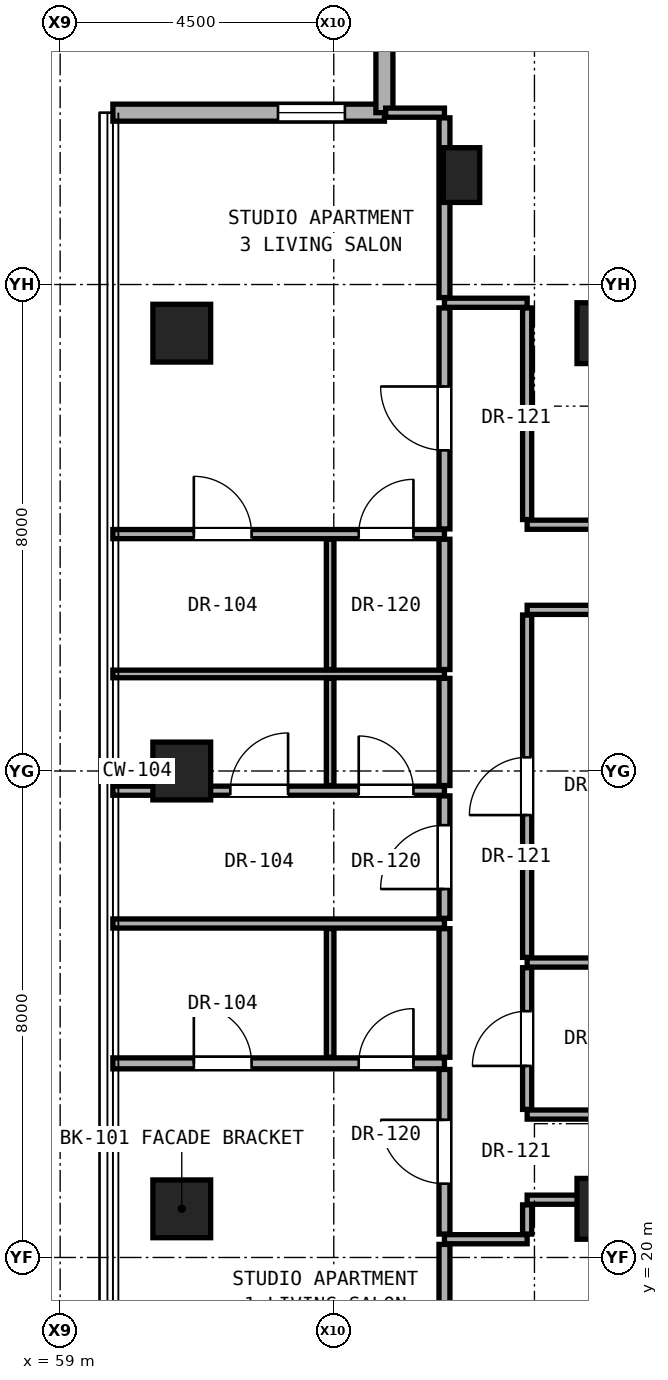
"""IFC4 building model, lengths in metres.
Left out: names, types, materials, properties, quantities, classifications, styles, units other than length and angle.
Written with IfcOpenShell. Run it as: python <this file> out.ifc"""

import sys

from ifc_helpers import new_model, si_unit, direction, frame, frame_2d, origin, origin_2d, place, context, subcontext, project, spatial, rectangle, hollow_rectangle, extrude, element, fill, save


model = new_model("IFC4")
c1 = context("Model", 3, precision=1e-05, world=origin(), true_north=direction((0.0, 1.0)))
c2 = subcontext(c1, "Body", "Model", "MODEL_VIEW")
j1 = project(units=[si_unit("LENGTHUNIT", "METRE"), si_unit("PLANEANGLEUNIT", "RADIAN")], contexts=[c1])
p1 = place(None, origin())
s1 = spatial("IfcSite", under=j1, at=p1, CompositionType="ELEMENT")
p2 = place(p1, origin())
s2 = spatial("IfcBuilding", under=s1, at=p2, CompositionType="ELEMENT")
p3 = place(p2, frame((0.0, 0.0, 154.4)))
s3 = spatial("IfcBuildingStorey", under=s2, at=p3, CompositionType="ELEMENT", Elevation=154.4)
for number, where, z_axis, x_axis in (
    (1, (68.0, 20.8, 0.0), (0.0, 0.0, 1.0), (1.0, 0.0, 0.0)),
    (2, (68.0, 35.2, 0.0), (0.0, 0.0, 1.0), (1.0, 0.0, 0.0)),
):
    element("IfcColumn", number, at=place(p3, frame(where, z_axis=z_axis, x_axis=x_axis)), inside=s3, PredefinedType="COLUMN", context=c2, shape_type="SweptSolid", body=[
        extrude(rectangle(XDim=1.0, YDim=1.0, at=origin_2d()), origin(), (0.0, 0.0, 1.0), 3.25),
    ])
for number, where, z_axis, x_axis in (
    (3, (61.0, 20.8, 0.0), (0.0, 0.0, 1.0), (1.0, 0.0, 0.0)),
    (4, (61.0, 28.0, 0.0), (0.0, 0.0, 1.0), (1.0, 0.0, 0.0)),
    (5, (61.0, 35.2, 0.0), (0.0, 0.0, 1.0), (1.0, 0.0, 0.0)),
):
    element("IfcColumn", number, at=place(p3, frame(where, z_axis=z_axis, x_axis=x_axis)), inside=s3, PredefinedType="COLUMN", context=c2, shape_type="SweptSolid", body=[
        extrude(hollow_rectangle(XDim=0.95, YDim=0.95, WallThickness=0.05, at=origin_2d()), origin(), (0.0, 0.0, 1.0), 3.25),
    ])
p4 = place(p3, frame((65.6, 37.8, 0.0), z_axis=(0.0, 0.0, 1.0), x_axis=(1.0, 0.0, 0.0)))
e6 = element("IfcColumn", 6, at=p4, inside=s3, PredefinedType="PILASTER", context=c2, shape_type="SweptSolid", body=[
    extrude(rectangle(XDim=0.6, YDim=0.9, at=origin_2d()), origin(), (0.0, 0.0, 1.0), 3.25),
])
p5 = place(p3, frame((64.333, 38.826, 0.0), z_axis=(0.0, 0.0, 1.0), x_axis=(-1.0, 0.0, 0.0)))
e7 = element("IfcWall", 7, at=p5, inside=s3, PredefinedType="SOLIDWALL", context=c2, shape_type="SweptSolid", body=[
    extrude(rectangle(XDim=4.465, YDim=0.28, at=frame_2d((2.233, 0.0))), origin(), (0.0, 0.0, 1.0), 3.03),
])
p6 = place(p5, frame((0.65, 0.0, 0.85)))
e8 = element("IfcOpeningElement", 8, at=p6, cuts=e7, PredefinedType="OPENING", context=c2, shape_type="SweptSolid", body=[
    extrude(rectangle(XDim=1.1, YDim=2.0, at=frame_2d((0.55, 1.0))), frame((0.0, 0.15, 0.0), z_axis=(0.0, -1.0, 0.0), x_axis=(1.0, 0.0, 0.0)), (0.0, 0.0, 1.0), 0.3),
])
p7 = place(p3, frame((64.333, 43.292, 0.0), z_axis=(0.0, 0.0, 1.0), x_axis=(0.0, -1.0, 0.0)))
e9 = element("IfcWall", 9, at=p7, inside=s3, PredefinedType="SOLIDWALL", context=c2, shape_type="SweptSolid", body=[
    extrude(rectangle(XDim=4.465, YDim=0.28, at=frame_2d((2.232, 0.0))), origin(), (0.0, 0.0, 1.0), 3.03),
])
p8 = place(p3, frame((65.32, 20.3, 0.0), z_axis=(0.0, 0.0, 1.0), x_axis=(1.0, 0.0, 0.0)))
e10 = element("IfcWall", 10, at=p8, inside=s3, PredefinedType="PARTITIONING", context=c2, shape_type="SweptSolid", body=[
    extrude(rectangle(XDim=1.36, YDim=0.15, at=frame_2d((0.68, 0.0))), origin(), (0.0, 0.0, 1.0), 3.05),
])
p9 = place(p3, frame((66.68, 20.95, 0.0), z_axis=(0.0, 0.0, 1.0), x_axis=(1.0, 0.0, 0.0)))
e11 = element("IfcWall", 11, at=p9, inside=s3, PredefinedType="PARTITIONING", context=c2, shape_type="SweptSolid", body=[
    extrude(rectangle(XDim=1.05, YDim=0.15, at=frame_2d((0.525, 0.0))), origin(), (0.0, 0.0, 1.0), 2.442),
])
p10 = place(p3, frame((66.68, 22.35, 0.0), z_axis=(0.0, 0.0, 1.0), x_axis=(1.0, 0.0, 0.0)))
e12 = element("IfcWall", 12, at=p10, inside=s3, PredefinedType="PARTITIONING", context=c2, shape_type="SweptSolid", body=[
    extrude(rectangle(XDim=19.5, YDim=0.15, at=frame_2d((9.75, 0.0))), origin(), (0.0, 0.0, 1.0), 2.186),
])
p11 = place(p10, frame((8.053, 0.0, 0.0)))
e13 = element("IfcOpeningElement", 13, at=p11, cuts=e12, PredefinedType="OPENING", context=c2, shape_type="SweptSolid", body=[
    extrude(rectangle(XDim=0.85, YDim=2.01, at=frame_2d((0.425, 1.005))), frame((0.0, 0.085, 0.0), z_axis=(0.0, -1.0, 0.0), x_axis=(1.0, 0.0, 0.0)), (0.0, 0.0, 1.0), 0.17),
])
p12 = place(p3, frame((59.867, 23.192, 0.0), z_axis=(0.0, 0.0, 1.0), x_axis=(1.0, 0.0, 0.0)))
e14 = element("IfcWall", 14, at=p12, inside=s3, PredefinedType="PARTITIONING", context=c2, shape_type="SweptSolid", body=[
    extrude(rectangle(XDim=5.453, YDim=0.18, at=frame_2d((2.727, 0.0))), origin(), (0.0, 0.0, 1.0), 2.269),
])
p13 = place(p12, frame((1.332, 0.0, 0.0)))
e15 = element("IfcOpeningElement", 15, at=p13, cuts=e14, PredefinedType="OPENING", context=c2, shape_type="SweptSolid", body=[
    extrude(rectangle(XDim=0.95, YDim=2.15, at=frame_2d((0.475, 1.075))), frame((0.0, 0.1, 0.0), z_axis=(0.0, -1.0, 0.0), x_axis=(1.0, 0.0, 0.0)), (0.0, 0.0, 1.0), 0.2),
])
p14 = place(p12, frame((4.043, 0.0, 0.0)))
e16 = element("IfcOpeningElement", 16, at=p14, cuts=e14, PredefinedType="OPENING", context=c2, shape_type="SweptSolid", body=[
    extrude(rectangle(XDim=0.9, YDim=2.1, at=frame_2d((0.45, 1.05))), frame((0.0, 0.1, 0.0), z_axis=(0.0, -1.0, 0.0), x_axis=(1.0, 0.0, 0.0)), (0.0, 0.0, 1.0), 0.2),
])
p15 = place(p3, frame((66.68, 24.85, 0.0), z_axis=(0.0, 0.0, 1.0), x_axis=(1.0, 0.0, 0.0)))
e17 = element("IfcWall", 17, at=p15, inside=s3, PredefinedType="PARTITIONING", context=c2, shape_type="SweptSolid", body=[
    extrude(rectangle(XDim=3.07, YDim=0.15, at=frame_2d((1.535, 0.0))), origin(), (0.0, 0.0, 1.0), 2.186),
])
p16 = place(p3, frame((59.867, 25.492, 0.0), z_axis=(0.0, 0.0, 1.0), x_axis=(1.0, 0.0, 0.0)))
e18 = element("IfcWall", 18, at=p16, inside=s3, PredefinedType="PARTITIONING", context=c2, shape_type="SweptSolid", body=[
    extrude(rectangle(XDim=5.453, YDim=0.15, at=frame_2d((2.727, 0.0))), origin(), (0.0, 0.0, 1.0), 2.269),
])
p17 = place(p3, frame((59.867, 27.676, 0.0), z_axis=(0.0, 0.0, 1.0), x_axis=(1.0, 0.0, 0.0)))
e19 = element("IfcWall", 19, at=p17, inside=s3, PredefinedType="PARTITIONING", context=c2, shape_type="SweptSolid", body=[
    extrude(rectangle(XDim=5.453, YDim=0.15, at=frame_2d((2.727, 0.0))), origin(), (0.0, 0.0, 1.0), 2.269),
])
p18 = place(p17, frame((1.931, 0.0, 0.0)))
e20 = element("IfcOpeningElement", 20, at=p18, cuts=e19, PredefinedType="OPENING", context=c2, shape_type="SweptSolid", body=[
    extrude(rectangle(XDim=0.95, YDim=2.15, at=frame_2d((0.475, 1.075))), frame((0.0, 0.085, 0.0), z_axis=(0.0, -1.0, 0.0), x_axis=(1.0, 0.0, 0.0)), (0.0, 0.0, 1.0), 0.17),
])
p19 = place(p17, frame((4.043, 0.0, 0.0)))
e21 = element("IfcOpeningElement", 21, at=p19, cuts=e19, PredefinedType="OPENING", context=c2, shape_type="SweptSolid", body=[
    extrude(rectangle(XDim=0.9, YDim=2.1, at=frame_2d((0.45, 1.05))), frame((0.0, 0.085, 0.0), z_axis=(0.0, -1.0, 0.0), x_axis=(1.0, 0.0, 0.0)), (0.0, 0.0, 1.0), 0.17),
])
p20 = place(p3, frame((59.867, 29.596, 0.0), z_axis=(0.0, 0.0, 1.0), x_axis=(1.0, 0.0, 0.0)))
e22 = element("IfcWall", 22, at=p20, inside=s3, PredefinedType="PARTITIONING", context=c2, shape_type="SweptSolid", body=[
    extrude(rectangle(XDim=5.453, YDim=0.125, at=frame_2d((2.727, 0.0))), origin(), (0.0, 0.0, 1.0), 2.269),
])
p21 = place(p3, frame((66.68, 30.65, 0.0), z_axis=(0.0, 0.0, 1.0), x_axis=(1.0, 0.0, 0.0)))
e23 = element("IfcWall", 23, at=p21, inside=s3, PredefinedType="PARTITIONING", context=c2, shape_type="SweptSolid", body=[
    extrude(rectangle(XDim=19.5, YDim=0.15, at=frame_2d((9.75, 0.0))), origin(), (0.0, 0.0, 1.0), 2.186),
])
p22 = place(p21, frame((3.745, 0.0, 0.0)))
e24 = element("IfcOpeningElement", 24, at=p22, cuts=e23, PredefinedType="OPENING", context=c2, shape_type="SweptSolid", body=[
    extrude(rectangle(XDim=0.95, YDim=2.15, at=frame_2d((0.475, 1.075))), frame((0.0, 0.085, 0.0), z_axis=(0.0, -1.0, 0.0), x_axis=(1.0, 0.0, 0.0)), (0.0, 0.0, 1.0), 0.17),
])
p23 = place(p21, frame((15.098, 0.0, 0.0)))
e25 = element("IfcOpeningElement", 25, at=p23, cuts=e23, PredefinedType="OPENING", context=c2, shape_type="SweptSolid", body=[
    extrude(rectangle(XDim=0.85, YDim=2.01, at=frame_2d((0.425, 1.005))), frame((0.0, 0.085, 0.0), z_axis=(0.0, -1.0, 0.0), x_axis=(1.0, 0.0, 0.0)), (0.0, 0.0, 1.0), 0.17),
])
p24 = place(p3, frame((59.867, 31.896, 0.0), z_axis=(0.0, 0.0, 1.0), x_axis=(1.0, 0.0, 0.0)))
e26 = element("IfcWall", 26, at=p24, inside=s3, PredefinedType="PARTITIONING", context=c2, shape_type="SweptSolid", body=[
    extrude(rectangle(XDim=5.453, YDim=0.15, at=frame_2d((2.727, 0.0))), origin(), (0.0, 0.0, 1.0), 2.269),
])
p25 = place(p24, frame((1.332, 0.0, 0.0)))
e27 = element("IfcOpeningElement", 27, at=p25, cuts=e26, PredefinedType="OPENING", context=c2, shape_type="SweptSolid", body=[
    extrude(rectangle(XDim=0.95, YDim=2.15, at=frame_2d((0.475, 1.075))), frame((0.0, 0.085, 0.0), z_axis=(0.0, -1.0, 0.0), x_axis=(1.0, 0.0, 0.0)), (0.0, 0.0, 1.0), 0.17),
])
p26 = place(p24, frame((4.043, 0.0, 0.0)))
e28 = element("IfcOpeningElement", 28, at=p26, cuts=e26, PredefinedType="OPENING", context=c2, shape_type="SweptSolid", body=[
    extrude(rectangle(XDim=0.9, YDim=2.1, at=frame_2d((0.45, 1.05))), frame((0.0, 0.085, 0.0), z_axis=(0.0, -1.0, 0.0), x_axis=(1.0, 0.0, 0.0)), (0.0, 0.0, 1.0), 0.17),
])
p27 = place(p3, frame((66.68, 32.05, 0.0), z_axis=(0.0, 0.0, 1.0), x_axis=(1.0, 0.0, 0.0)))
e29 = element("IfcWall", 29, at=p27, inside=s3, PredefinedType="PARTITIONING", context=c2, shape_type="SweptSolid", body=[
    extrude(rectangle(XDim=2.12, YDim=0.15, at=frame_2d((1.06, 0.0))), origin(), (0.0, 0.0, 1.0), 2.186),
])
p28 = place(p3, frame((65.32, 35.7, 0.0), z_axis=(0.0, 0.0, 1.0), x_axis=(1.0, 0.0, 0.0)))
e30 = element("IfcWall", 30, at=p28, inside=s3, PredefinedType="PARTITIONING", context=c2, shape_type="SweptSolid", body=[
    extrude(rectangle(XDim=1.36, YDim=0.15, at=frame_2d((0.68, 0.0))), origin(), (0.0, 0.0, 1.0), 3.05),
])
p29 = place(p3, frame((64.353, 38.826, 0.0), z_axis=(0.0, 0.0, 1.0), x_axis=(1.0, 0.0, 0.0)))
e31 = element("IfcWall", 31, at=p29, inside=s3, PredefinedType="PARTITIONING", context=c2, shape_type="SweptSolid", body=[
    extrude(rectangle(XDim=0.967, YDim=0.15, at=frame_2d((0.484, 0.0))), origin(), (0.0, 0.0, 1.0), 3.05),
])
p30 = place(p3, frame((63.44, 23.292, 0.0), z_axis=(0.0, 0.0, 1.0), x_axis=(0.0, 1.0, 0.0)))
e32 = element("IfcWall", 32, at=p30, inside=s3, PredefinedType="PARTITIONING", context=c2, shape_type="SweptSolid", body=[
    extrude(rectangle(XDim=2.115, YDim=0.125, at=frame_2d((1.058, 0.0))), origin(), (0.0, 0.0, 1.0), 3.05),
])
p31 = place(p3, frame((63.44, 27.761, 0.0), z_axis=(0.0, 0.0, 1.0), x_axis=(0.0, 1.0, 0.0)))
e33 = element("IfcWall", 33, at=p31, inside=s3, PredefinedType="PARTITIONING", context=c2, shape_type="SweptSolid", body=[
    extrude(rectangle(XDim=1.762, YDim=0.125, at=frame_2d((0.881, 0.0))), origin(), (0.0, 0.0, 1.0), 2.346),
])
p32 = place(p3, frame((63.44, 29.668, 0.0), z_axis=(0.0, 0.0, 1.0), x_axis=(0.0, 1.0, 0.0)))
e34 = element("IfcWall", 34, at=p32, inside=s3, PredefinedType="PARTITIONING", context=c2, shape_type="SweptSolid", body=[
    extrude(rectangle(XDim=2.143, YDim=0.125, at=frame_2d((1.071, 0.0))), origin(), (0.0, 0.0, 1.0), 3.05),
])
p33 = place(p3, frame((65.32, 17.274, 0.0), z_axis=(0.0, 0.0, 1.0), x_axis=(0.0, 1.0, 0.0)))
e35 = element("IfcWall", 35, at=p33, inside=s3, PredefinedType="PARTITIONING", context=c2, shape_type="SweptSolid", body=[
    extrude(rectangle(XDim=2.941, YDim=0.18, at=frame_2d((1.471, 0.0))), origin(), (0.0, 0.0, 1.0), 2.493),
])
p34 = place(p3, frame((65.32, 20.385, 0.0), z_axis=(0.0, 0.0, 1.0), x_axis=(0.0, 1.0, 0.0)))
e36 = element("IfcWall", 36, at=p34, inside=s3, PredefinedType="PARTITIONING", context=c2, shape_type="SweptSolid", body=[
    extrude(rectangle(XDim=2.707, YDim=0.18, at=frame_2d((1.354, 0.0))), origin(), (0.0, 0.0, 1.0), 2.442),
])
p35 = place(p34, frame((0.829, 0.0, 0.0)))
e37 = element("IfcOpeningElement", 37, at=p35, cuts=e36, PredefinedType="OPENING", context=c2, shape_type="SweptSolid", body=[
    extrude(rectangle(XDim=1.05, YDim=2.2, at=frame_2d((0.525, 1.1))), frame((0.0, 0.1, 0.0), z_axis=(0.0, -1.0, 0.0), x_axis=(1.0, 0.0, 0.0)), (0.0, 0.0, 1.0), 0.2),
])
p36 = place(p3, frame((65.32, 23.292, 0.0), z_axis=(0.0, 0.0, 1.0), x_axis=(0.0, 1.0, 0.0)))
e38 = element("IfcWall", 38, at=p36, inside=s3, PredefinedType="PARTITIONING", context=c2, shape_type="SweptSolid", body=[
    extrude(rectangle(XDim=2.115, YDim=0.18, at=frame_2d((1.058, 0.0))), origin(), (0.0, 0.0, 1.0), 3.05),
])
p37 = place(p3, frame((65.32, 25.577, 0.0), z_axis=(0.0, 0.0, 1.0), x_axis=(0.0, 1.0, 0.0)))
e39 = element("IfcWall", 39, at=p37, inside=s3, PredefinedType="PARTITIONING", context=c2, shape_type="SweptSolid", body=[
    extrude(rectangle(XDim=2.014, YDim=0.18, at=frame_2d((1.007, 0.0))), origin(), (0.0, 0.0, 1.0), 3.05),
])
p38 = place(p37, frame((0.482, 0.0, 0.0)))
e40 = element("IfcOpeningElement", 40, at=p38, cuts=e39, PredefinedType="OPENING", context=c2, shape_type="SweptSolid", body=[
    extrude(rectangle(XDim=1.05, YDim=2.2, at=frame_2d((0.525, 1.1))), frame((0.0, 0.1, 0.0), z_axis=(0.0, -1.0, 0.0), x_axis=(1.0, 0.0, 0.0)), (0.0, 0.0, 1.0), 0.2),
])
p39 = place(p3, frame((65.32, 27.761, 0.0), z_axis=(0.0, 0.0, 1.0), x_axis=(0.0, 1.0, 0.0)))
e41 = element("IfcWall", 41, at=p39, inside=s3, PredefinedType="PARTITIONING", context=c2, shape_type="SweptSolid", body=[
    extrude(rectangle(XDim=1.762, YDim=0.18, at=frame_2d((0.881, 0.0))), origin(), (0.0, 0.0, 1.0), 2.346),
])
p40 = place(p3, frame((65.32, 29.668, 0.0), z_axis=(0.0, 0.0, 1.0), x_axis=(0.0, 1.0, 0.0)))
e42 = element("IfcWall", 42, at=p40, inside=s3, PredefinedType="PARTITIONING", context=c2, shape_type="SweptSolid", body=[
    extrude(rectangle(XDim=2.143, YDim=0.18, at=frame_2d((1.071, 0.0))), origin(), (0.0, 0.0, 1.0), 3.05),
])
p41 = place(p3, frame((65.32, 31.981, 0.0), z_axis=(0.0, 0.0, 1.0), x_axis=(0.0, 1.0, 0.0)))
e43 = element("IfcWall", 43, at=p41, inside=s3, PredefinedType="PARTITIONING", context=c2, shape_type="SweptSolid", body=[
    extrude(rectangle(XDim=3.634, YDim=0.18, at=frame_2d((1.817, 0.0))), origin(), (0.0, 0.0, 1.0), 2.442),
])
p42 = place(p41, frame((1.292, 0.0, 0.0)))
e44 = element("IfcOpeningElement", 44, at=p42, cuts=e43, PredefinedType="OPENING", context=c2, shape_type="SweptSolid", body=[
    extrude(rectangle(XDim=1.05, YDim=2.2, at=frame_2d((0.525, 1.1))), frame((0.0, 0.1, 0.0), z_axis=(0.0, -1.0, 0.0), x_axis=(1.0, 0.0, 0.0)), (0.0, 0.0, 1.0), 0.2),
])
p43 = place(p3, frame((65.32, 35.785, 0.0), z_axis=(0.0, 0.0, 1.0), x_axis=(0.0, 1.0, 0.0)))
e45 = element("IfcWall", 45, at=p43, inside=s3, PredefinedType="PARTITIONING", context=c2, shape_type="SweptSolid", body=[
    extrude(rectangle(XDim=2.956, YDim=0.18, at=frame_2d((1.478, 0.0))), origin(), (0.0, 0.0, 1.0), 2.493),
])
p44 = place(p3, frame((66.68, 20.385, 0.0), z_axis=(0.0, 0.0, 1.0), x_axis=(0.0, 1.0, 0.0)))
e46 = element("IfcWall", 46, at=p44, inside=s3, PredefinedType="PARTITIONING", context=c2, shape_type="SweptSolid", body=[
    extrude(rectangle(XDim=0.48, YDim=0.15, at=frame_2d((0.24, 0.0))), origin(), (0.0, 0.0, 1.0), 2.442),
])
p45 = place(p3, frame((66.68, 22.435, 0.0), z_axis=(0.0, 0.0, 1.0), x_axis=(0.0, 1.0, 0.0)))
e47 = element("IfcWall", 47, at=p45, inside=s3, PredefinedType="PARTITIONING", context=c2, shape_type="SweptSolid", body=[
    extrude(rectangle(XDim=2.33, YDim=0.15, at=frame_2d((1.165, 0.0))), origin(), (0.0, 0.0, 1.0), 3.05),
])
p46 = place(p45, frame((0.715, 0.0, 0.0)))
e48 = element("IfcOpeningElement", 48, at=p46, cuts=e47, PredefinedType="OPENING", context=c2, shape_type="SweptSolid", body=[
    extrude(rectangle(XDim=0.9, YDim=2.1, at=frame_2d((0.45, 1.05))), frame((0.0, 0.085, 0.0), z_axis=(0.0, -1.0, 0.0), x_axis=(1.0, 0.0, 0.0)), (0.0, 0.0, 1.0), 0.17),
])
p47 = place(p3, frame((66.68, 24.935, 0.0), z_axis=(0.0, 0.0, 1.0), x_axis=(0.0, 1.0, 0.0)))
e49 = element("IfcWall", 49, at=p47, inside=s3, PredefinedType="PARTITIONING", context=c2, shape_type="SweptSolid", body=[
    extrude(rectangle(XDim=5.63, YDim=0.15, at=frame_2d((2.815, 0.0))), origin(), (0.0, 0.0, 1.0), 2.346),
])
p48 = place(p47, frame((2.34, 0.0, 0.0)))
e50 = element("IfcOpeningElement", 50, at=p48, cuts=e49, PredefinedType="OPENING", context=c2, shape_type="SweptSolid", body=[
    extrude(rectangle(XDim=0.95, YDim=2.15, at=frame_2d((0.475, 1.075))), frame((0.0, 0.085, 0.0), z_axis=(0.0, -1.0, 0.0), x_axis=(1.0, 0.0, 0.0)), (0.0, 0.0, 1.0), 0.17),
])
p49 = place(p3, frame((66.68, 32.135, 0.0), z_axis=(0.0, 0.0, 1.0), x_axis=(0.0, 1.0, 0.0)))
e51 = element("IfcWall", 51, at=p49, inside=s3, PredefinedType="PARTITIONING", context=c2, shape_type="SweptSolid", body=[
    extrude(rectangle(XDim=3.48, YDim=0.15, at=frame_2d((1.74, 0.0))), origin(), (0.0, 0.0, 1.0), 2.442),
])
p50 = place(p6, origin())
e52 = element("IfcWindow", 52, at=p50, inside=s3, PartitioningType="SINGLE_PANEL", PredefinedType="WINDOW", context=c2, shape_type="SweptSolid", body=[
    extrude(rectangle(XDim=1.1, YDim=2.0, at=frame_2d((0.55, 1.0))), frame((0.0, 0.03, 0.0), z_axis=(0.0, -1.0, 0.0), x_axis=(1.0, 0.0, 0.0)), (0.0, 0.0, 1.0), 0.06),
])
fill(e8, e52)
p51 = place(p46, origin())
e53 = element("IfcDoor", 53, at=p51, inside=s3, OperationType="SINGLE_SWING_LEFT", PredefinedType="DOOR", context=c2, shape_type="SweptSolid", body=[
    extrude(rectangle(XDim=0.9, YDim=2.1, at=frame_2d((0.45, 1.05))), frame((0.0, 0.025, 0.0), z_axis=(0.0, -1.0, 0.0), x_axis=(1.0, 0.0, 0.0)), (0.0, 0.0, 1.0), 0.05),
])
fill(e48, e53)
p52 = place(p35, origin())
e54 = element("IfcDoor", 54, at=p52, inside=s3, OperationType="SINGLE_SWING_RIGHT", PredefinedType="DOOR", context=c2, shape_type="SweptSolid", body=[
    extrude(rectangle(XDim=1.05, YDim=2.2, at=frame_2d((0.525, 1.1))), frame((0.0, 0.025, 0.0), z_axis=(0.0, -1.0, 0.0), x_axis=(1.0, 0.0, 0.0)), (0.0, 0.0, 1.0), 0.05),
])
fill(e37, e54)
p53 = place(p13, origin())
e55 = element("IfcDoor", 55, at=p53, inside=s3, OperationType="SINGLE_SWING_LEFT", PredefinedType="DOOR", context=c2, shape_type="SweptSolid", body=[
    extrude(rectangle(XDim=0.95, YDim=2.15, at=frame_2d((0.475, 1.075))), frame((0.0, 0.025, 0.0), z_axis=(0.0, -1.0, 0.0), x_axis=(1.0, 0.0, 0.0)), (0.0, 0.0, 1.0), 0.05),
])
fill(e15, e55)
p54 = place(p14, origin())
e56 = element("IfcDoor", 56, at=p54, inside=s3, OperationType="SINGLE_SWING_RIGHT", PredefinedType="DOOR", context=c2, shape_type="SweptSolid", body=[
    extrude(rectangle(XDim=0.9, YDim=2.1, at=frame_2d((0.45, 1.05))), frame((0.0, 0.025, 0.0), z_axis=(0.0, -1.0, 0.0), x_axis=(1.0, 0.0, 0.0)), (0.0, 0.0, 1.0), 0.05),
])
fill(e16, e56)
p55 = place(p38, origin())
e57 = element("IfcDoor", 57, at=p55, inside=s3, OperationType="SINGLE_SWING_LEFT", PredefinedType="DOOR", context=c2, shape_type="SweptSolid", body=[
    extrude(rectangle(XDim=1.05, YDim=2.2, at=frame_2d((0.525, 1.1))), frame((0.0, 0.025, 0.0), z_axis=(0.0, -1.0, 0.0), x_axis=(1.0, 0.0, 0.0)), (0.0, 0.0, 1.0), 0.05),
])
fill(e40, e57)
p56 = place(p18, origin())
e58 = element("IfcDoor", 58, at=p56, inside=s3, OperationType="SINGLE_SWING_RIGHT", PredefinedType="DOOR", context=c2, shape_type="SweptSolid", body=[
    extrude(rectangle(XDim=0.95, YDim=2.15, at=frame_2d((0.475, 1.075))), frame((0.0, 0.025, 0.0), z_axis=(0.0, -1.0, 0.0), x_axis=(1.0, 0.0, 0.0)), (0.0, 0.0, 1.0), 0.05),
])
fill(e20, e58)
p57 = place(p19, origin())
e59 = element("IfcDoor", 59, at=p57, inside=s3, OperationType="SINGLE_SWING_LEFT", PredefinedType="DOOR", context=c2, shape_type="SweptSolid", body=[
    extrude(rectangle(XDim=0.9, YDim=2.1, at=frame_2d((0.45, 1.05))), frame((0.0, 0.025, 0.0), z_axis=(0.0, -1.0, 0.0), x_axis=(1.0, 0.0, 0.0)), (0.0, 0.0, 1.0), 0.05),
])
fill(e21, e59)
p58 = place(p42, origin())
e60 = element("IfcDoor", 60, at=p58, inside=s3, OperationType="SINGLE_SWING_RIGHT", PredefinedType="DOOR", context=c2, shape_type="SweptSolid", body=[
    extrude(rectangle(XDim=1.05, YDim=2.2, at=frame_2d((0.525, 1.1))), frame((0.0, 0.025, 0.0), z_axis=(0.0, -1.0, 0.0), x_axis=(1.0, 0.0, 0.0)), (0.0, 0.0, 1.0), 0.05),
])
fill(e44, e60)
p59 = place(p25, origin())
e61 = element("IfcDoor", 61, at=p59, inside=s3, OperationType="SINGLE_SWING_LEFT", PredefinedType="DOOR", context=c2, shape_type="SweptSolid", body=[
    extrude(rectangle(XDim=0.95, YDim=2.15, at=frame_2d((0.475, 1.075))), frame((0.0, 0.025, 0.0), z_axis=(0.0, -1.0, 0.0), x_axis=(1.0, 0.0, 0.0)), (0.0, 0.0, 1.0), 0.05),
])
fill(e27, e61)
p60 = place(p26, origin())
e62 = element("IfcDoor", 62, at=p60, inside=s3, OperationType="SINGLE_SWING_RIGHT", PredefinedType="DOOR", context=c2, shape_type="SweptSolid", body=[
    extrude(rectangle(XDim=0.9, YDim=2.1, at=frame_2d((0.45, 1.05))), frame((0.0, 0.025, 0.0), z_axis=(0.0, -1.0, 0.0), x_axis=(1.0, 0.0, 0.0)), (0.0, 0.0, 1.0), 0.05),
])
fill(e28, e62)
p61 = place(p48, origin())
e63 = element("IfcDoor", 63, at=p61, inside=s3, OperationType="SINGLE_SWING_LEFT", PredefinedType="DOOR", context=c2, shape_type="SweptSolid", body=[
    extrude(rectangle(XDim=0.95, YDim=2.15, at=frame_2d((0.475, 1.075))), frame((0.0, 0.025, 0.0), z_axis=(0.0, -1.0, 0.0), x_axis=(1.0, 0.0, 0.0)), (0.0, 0.0, 1.0), 0.05),
])
fill(e50, e63)
save(model, sys.argv[1])
